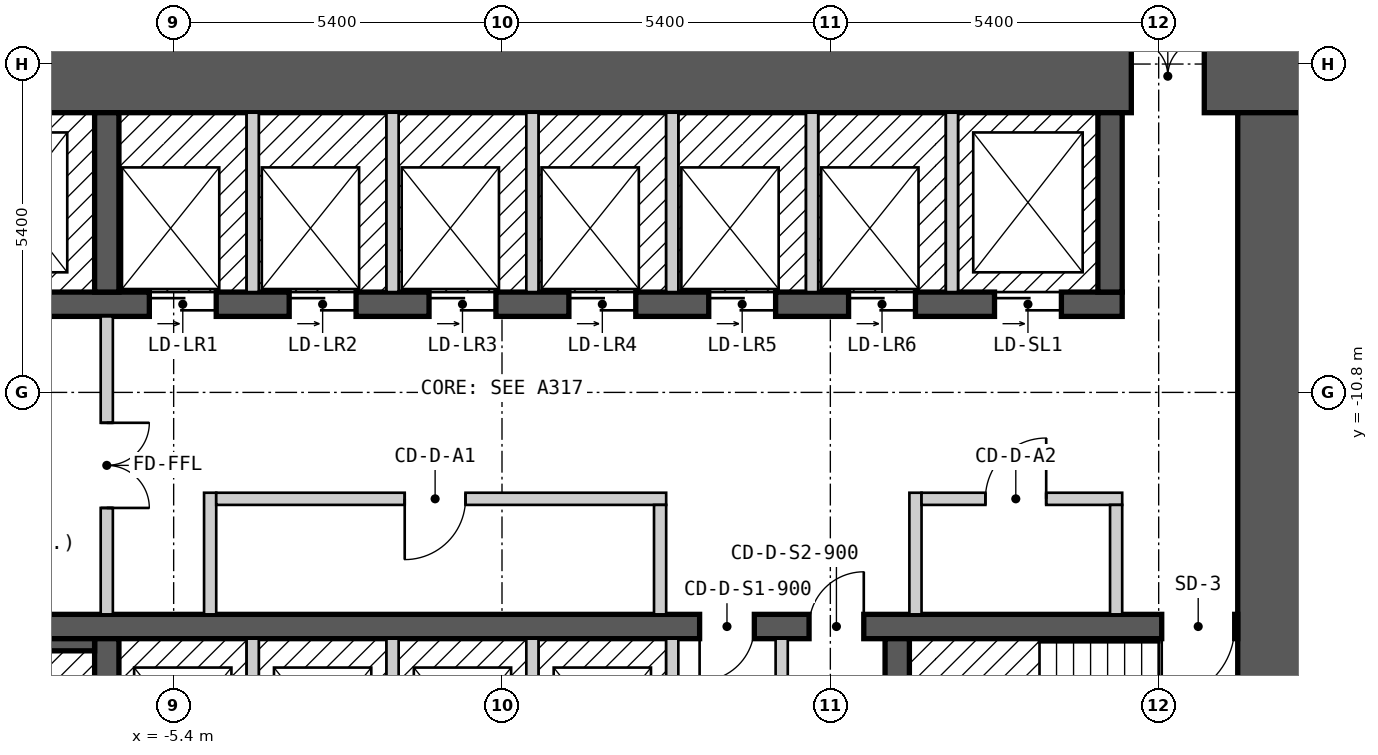
"""IFC4 building model, lengths in metres.
Left out: names, types, materials, properties, quantities, classifications, styles, units other than length and angle.
Written with IfcOpenShell. Run it as: python <this file> out.ifc"""

import sys

from ifc_helpers import new_model, si_unit, direction, frame, frame_2d, origin, place, context, subcontext, project, spatial, rectangle, extrude, element, fill, save


model = new_model("IFC4")
c1 = context("Model", 3, precision=1e-05, world=origin(), true_north=direction((0.0, 1.0)))
c2 = subcontext(c1, "Body", "Model", "MODEL_VIEW")
j1 = project(units=[si_unit("LENGTHUNIT", "METRE"), si_unit("PLANEANGLEUNIT", "RADIAN")], contexts=[c1])
p1 = place(None, origin())
s1 = spatial("IfcSite", under=j1, at=p1, CompositionType="ELEMENT")
p2 = place(p1, origin())
s2 = spatial("IfcBuilding", under=s1, at=p2, CompositionType="ELEMENT")
p3 = place(p2, frame((0.0, 0.0, 50.4)))
s3 = spatial("IfcBuildingStorey", under=s2, at=p3, CompositionType="ELEMENT", Elevation=50.4)
p4 = place(p3, frame((-13.3, -5.6, 0.0), z_axis=(0.0, 0.0, 1.0), x_axis=(1.0, 0.0, 0.0)))
e1 = element("IfcWall", 1, at=p4, inside=s3, PredefinedType="SHEAR", context=c2, shape_type="SweptSolid", body=[
    extrude(rectangle(XDim=26.6, YDim=1.2, at=frame_2d((13.3, 0.0))), origin(), (0.0, 0.0, 1.0), 2.7),
])
p5 = place(p4, frame((23.65, 0.0, 0.0)))
e2 = element("IfcOpeningElement", 2, at=p5, cuts=e1, PredefinedType="OPENING", context=c2, shape_type="SweptSolid", body=[
    extrude(rectangle(XDim=1.2, YDim=2.1, at=frame_2d((0.6, 1.05))), frame((0.0, 0.61, 0.0), z_axis=(0.0, -1.0, 0.0), x_axis=(1.0, 0.0, 0.0)), (0.0, 0.0, 1.0), 1.22),
])
p6 = place(p3, frame((12.7, -17.8, 0.0), z_axis=(0.0, 0.0, 1.0), x_axis=(0.0, 1.0, 0.0)))
e3 = element("IfcWall", 3, at=p6, inside=s3, PredefinedType="SHEAR", context=c2, shape_type="SweptSolid", body=[
    extrude(rectangle(XDim=11.6, YDim=1.2, at=frame_2d((5.8, 0.0))), origin(), (0.0, 0.0, 1.0), 2.7),
])
p7 = place(p3, frame((-12.1, -14.65, 0.0), z_axis=(0.0, 0.0, 1.0), x_axis=(1.0, 0.0, 0.0)))
e4 = element("IfcWall", 4, at=p7, inside=s3, PredefinedType="SHEAR", context=c2, shape_type="SweptSolid", body=[
    extrude(rectangle(XDim=24.2, YDim=0.4, at=frame_2d((12.1, 0.0))), origin(), (0.0, 0.0, 1.0), 2.7),
])
p8 = place(p7, frame((1.3, 0.0, 0.0), z_axis=(0.0, 0.0, 1.0), x_axis=(-1.0, 0.0, 0.0)))
e5 = element("IfcOpeningElement", 5, at=p8, cuts=e4, PredefinedType="OPENING", context=c2, shape_type="SweptSolid", body=[
    extrude(rectangle(XDim=1.2, YDim=2.1, at=frame_2d((0.6, 1.05))), frame((0.0, 0.21, 0.0), z_axis=(0.0, -1.0, 0.0), x_axis=(1.0, 0.0, 0.0)), (0.0, 0.0, 1.0), 0.42),
])
p9 = place(p7, frame((24.15, 0.0, 0.0), z_axis=(0.0, 0.0, 1.0), x_axis=(-1.0, 0.0, 0.0)))
e6 = element("IfcOpeningElement", 6, at=p9, cuts=e4, PredefinedType="OPENING", context=c2, shape_type="SweptSolid", body=[
    extrude(rectangle(XDim=1.2, YDim=2.1, at=frame_2d((0.6, 1.05))), frame((0.0, 0.21, 0.0), z_axis=(0.0, -1.0, 0.0), x_axis=(1.0, 0.0, 0.0)), (0.0, 0.0, 1.0), 0.42),
])
p10 = place(p7, frame((16.25, 0.0, 0.0), z_axis=(0.0, 0.0, 1.0), x_axis=(-1.0, 0.0, 0.0)))
e7 = element("IfcOpeningElement", 7, at=p10, cuts=e4, PredefinedType="OPENING", context=c2, shape_type="SweptSolid", body=[
    extrude(rectangle(XDim=0.9, YDim=2.1, at=frame_2d((0.45, 1.05))), frame((0.0, 0.21, 0.0), z_axis=(0.0, -1.0, 0.0), x_axis=(1.0, 0.0, 0.0)), (0.0, 0.0, 1.0), 0.42),
])
p11 = place(p7, frame((18.05, 0.0, 0.0), z_axis=(0.0, 0.0, 1.0), x_axis=(-1.0, 0.0, 0.0)))
e8 = element("IfcOpeningElement", 8, at=p11, cuts=e4, PredefinedType="OPENING", context=c2, shape_type="SweptSolid", body=[
    extrude(rectangle(XDim=0.9, YDim=2.1, at=frame_2d((0.45, 1.05))), frame((0.0, 0.21, 0.0), z_axis=(0.0, -1.0, 0.0), x_axis=(1.0, 0.0, 0.0)), (0.0, 0.0, 1.0), 0.42),
])
p12 = place(p3, frame((-12.1, -9.35, 0.0), z_axis=(0.0, 0.0, 1.0), x_axis=(1.0, 0.0, 0.0)))
e9 = element("IfcWall", 9, at=p12, inside=s3, PredefinedType="SHEAR", context=c2, shape_type="SweptSolid", body=[
    extrude(rectangle(XDim=22.3, YDim=0.4, at=frame_2d((11.15, 0.0))), origin(), (0.0, 0.0, 1.0), 2.7),
])
p13 = place(p12, frame((0.7, 0.0, 0.0)))
e10 = element("IfcOpeningElement", 10, at=p13, cuts=e9, PredefinedType="OPENING", context=c2, shape_type="SweptSolid", body=[
    extrude(rectangle(XDim=1.1, YDim=2.1, at=frame_2d((0.55, 1.05))), frame((0.0, 0.21, 0.0), z_axis=(0.0, -1.0, 0.0), x_axis=(1.0, 0.0, 0.0)), (0.0, 0.0, 1.0), 0.42),
])
p14 = place(p12, frame((3.5, 0.0, 0.0)))
e11 = element("IfcOpeningElement", 11, at=p14, cuts=e9, PredefinedType="OPENING", context=c2, shape_type="SweptSolid", body=[
    extrude(rectangle(XDim=1.1, YDim=2.1, at=frame_2d((0.55, 1.05))), frame((0.0, 0.21, 0.0), z_axis=(0.0, -1.0, 0.0), x_axis=(1.0, 0.0, 0.0)), (0.0, 0.0, 1.0), 0.42),
])
p15 = place(p12, frame((6.3, 0.0, 0.0)))
e12 = element("IfcOpeningElement", 12, at=p15, cuts=e9, PredefinedType="OPENING", context=c2, shape_type="SweptSolid", body=[
    extrude(rectangle(XDim=1.1, YDim=2.1, at=frame_2d((0.55, 1.05))), frame((0.0, 0.21, 0.0), z_axis=(0.0, -1.0, 0.0), x_axis=(1.0, 0.0, 0.0)), (0.0, 0.0, 1.0), 0.42),
])
p16 = place(p12, frame((8.6, 0.0, 0.0)))
e13 = element("IfcOpeningElement", 13, at=p16, cuts=e9, PredefinedType="OPENING", context=c2, shape_type="SweptSolid", body=[
    extrude(rectangle(XDim=1.1, YDim=2.1, at=frame_2d((0.55, 1.05))), frame((0.0, 0.21, 0.0), z_axis=(0.0, -1.0, 0.0), x_axis=(1.0, 0.0, 0.0)), (0.0, 0.0, 1.0), 0.42),
])
p17 = place(p12, frame((10.9, 0.0, 0.0)))
e14 = element("IfcOpeningElement", 14, at=p17, cuts=e9, PredefinedType="OPENING", context=c2, shape_type="SweptSolid", body=[
    extrude(rectangle(XDim=1.1, YDim=2.1, at=frame_2d((0.55, 1.05))), frame((0.0, 0.21, 0.0), z_axis=(0.0, -1.0, 0.0), x_axis=(1.0, 0.0, 0.0)), (0.0, 0.0, 1.0), 0.42),
])
p18 = place(p12, frame((13.2, 0.0, 0.0)))
e15 = element("IfcOpeningElement", 15, at=p18, cuts=e9, PredefinedType="OPENING", context=c2, shape_type="SweptSolid", body=[
    extrude(rectangle(XDim=1.1, YDim=2.1, at=frame_2d((0.55, 1.05))), frame((0.0, 0.21, 0.0), z_axis=(0.0, -1.0, 0.0), x_axis=(1.0, 0.0, 0.0)), (0.0, 0.0, 1.0), 0.42),
])
p19 = place(p12, frame((15.5, 0.0, 0.0)))
e16 = element("IfcOpeningElement", 16, at=p19, cuts=e9, PredefinedType="OPENING", context=c2, shape_type="SweptSolid", body=[
    extrude(rectangle(XDim=1.1, YDim=2.1, at=frame_2d((0.55, 1.05))), frame((0.0, 0.21, 0.0), z_axis=(0.0, -1.0, 0.0), x_axis=(1.0, 0.0, 0.0)), (0.0, 0.0, 1.0), 0.42),
])
p20 = place(p12, frame((17.8, 0.0, 0.0)))
e17 = element("IfcOpeningElement", 17, at=p20, cuts=e9, PredefinedType="OPENING", context=c2, shape_type="SweptSolid", body=[
    extrude(rectangle(XDim=1.1, YDim=2.1, at=frame_2d((0.55, 1.05))), frame((0.0, 0.21, 0.0), z_axis=(0.0, -1.0, 0.0), x_axis=(1.0, 0.0, 0.0)), (0.0, 0.0, 1.0), 0.42),
])
p21 = place(p12, frame((20.2, 0.0, 0.0)))
e18 = element("IfcOpeningElement", 18, at=p21, cuts=e9, PredefinedType="OPENING", context=c2, shape_type="SweptSolid", body=[
    extrude(rectangle(XDim=1.1, YDim=2.1, at=frame_2d((0.55, 1.05))), frame((0.0, 0.21, 0.0), z_axis=(0.0, -1.0, 0.0), x_axis=(1.0, 0.0, 0.0)), (0.0, 0.0, 1.0), 0.42),
])
for number, where, z_axis, x_axis in (
    (19, (-6.5, -17.8, 0.0), (0.0, 0.0, 1.0), (0.0, 1.0, 0.0)),
    (20, (6.5, -17.8, 0.0), (0.0, 0.0, 1.0), (0.0, 1.0, 0.0)),
    (21, (-6.5, -9.15, 0.0), (0.0, 0.0, 1.0), (0.0, 1.0, 0.0)),
    (22, (10.0, -9.15, 0.0), (0.0, 0.0, 1.0), (0.0, 1.0, 0.0)),
):
    element("IfcWall", number, at=place(p3, frame(where, z_axis=z_axis, x_axis=x_axis)), inside=s3, PredefinedType="SHEAR", context=c2, shape_type="SweptSolid", body=[
        extrude(rectangle(XDim=2.95, YDim=0.4, at=frame_2d((1.475, 0.0))), origin(), (0.0, 0.0, 1.0), 2.7),
    ])
p22 = place(p3, frame((-10.8, -14.95, 0.0), z_axis=(0.0, 0.0, 1.0), x_axis=(1.0, 0.0, 0.0)))
e23 = element("IfcWall", 23, at=p22, inside=s3, PredefinedType="SOLIDWALL", context=c2, shape_type="SweptSolid", body=[
    extrude(rectangle(XDim=4.1, YDim=0.2, at=frame_2d((2.05, 0.0))), origin(), (0.0, 0.0, 1.0), 2.7),
])
p23 = place(p3, frame((-6.5, -14.45, 0.0), z_axis=(0.0, 0.0, 1.0), x_axis=(0.0, 1.0, 0.0)))
e24 = element("IfcWall", 24, at=p23, inside=s3, PredefinedType="PARTITIONING", context=c2, shape_type="SweptSolid", body=[
    extrude(rectangle(XDim=4.9, YDim=0.2, at=frame_2d((2.45, 0.0))), origin(), (0.0, 0.0, 1.0), 2.7),
])
p24 = place(p23, frame((3.15, 0.0, 0.0), z_axis=(0.0, 0.0, 1.0), x_axis=(-1.0, 0.0, 0.0)))
e25 = element("IfcOpeningElement", 25, at=p24, cuts=e24, PredefinedType="OPENING", context=c2, shape_type="SweptSolid", body=[
    extrude(rectangle(XDim=1.4, YDim=2.1, at=frame_2d((0.7, 1.05))), frame((0.0, 0.11, 0.0), z_axis=(0.0, -1.0, 0.0), x_axis=(1.0, 0.0, 0.0)), (0.0, 0.0, 1.0), 0.22),
])
p25 = place(p3, frame((-4.8, -14.45, 0.0), z_axis=(0.0, 0.0, 1.0), x_axis=(0.0, 1.0, 0.0)))
e26 = element("IfcWall", 26, at=p25, inside=s3, PredefinedType="PARTITIONING", context=c2, shape_type="SweptSolid", body=[
    extrude(rectangle(XDim=2.0, YDim=0.2, at=frame_2d((1.0, 0.0))), origin(), (0.0, 0.0, 1.0), 2.7),
])
p26 = place(p3, frame((-4.7, -12.55, 0.0), z_axis=(0.0, 0.0, 1.0), x_axis=(1.0, 0.0, 0.0)))
e27 = element("IfcWall", 27, at=p26, inside=s3, PredefinedType="PARTITIONING", context=c2, shape_type="SweptSolid", body=[
    extrude(rectangle(XDim=7.4, YDim=0.2, at=frame_2d((3.7, 0.0))), origin(), (0.0, 0.0, 1.0), 2.7),
])
p27 = place(p26, frame((4.1, 0.0, 0.0), z_axis=(0.0, 0.0, 1.0), x_axis=(-1.0, 0.0, 0.0)))
e28 = element("IfcOpeningElement", 28, at=p27, cuts=e27, PredefinedType="OPENING", context=c2, shape_type="SweptSolid", body=[
    extrude(rectangle(XDim=1.0, YDim=2.1, at=frame_2d((0.5, 1.05))), frame((0.0, 0.11, 0.0), z_axis=(0.0, -1.0, 0.0), x_axis=(1.0, 0.0, 0.0)), (0.0, 0.0, 1.0), 0.22),
])
for number, where, z_axis, x_axis in (
    (29, (-4.1, -17.8, 0.0), (0.0, 0.0, 1.0), (0.0, 1.0, 0.0)),
    (30, (-4.1, -9.15, 0.0), (0.0, 0.0, 1.0), (0.0, 1.0, 0.0)),
    (31, (-1.8, -17.8, 0.0), (0.0, 0.0, 1.0), (0.0, 1.0, 0.0)),
    (32, (-1.8, -9.15, 0.0), (0.0, 0.0, 1.0), (0.0, 1.0, 0.0)),
    (33, (0.5, -17.8, 0.0), (0.0, 0.0, 1.0), (0.0, 1.0, 0.0)),
    (34, (0.5, -9.15, 0.0), (0.0, 0.0, 1.0), (0.0, 1.0, 0.0)),
):
    element("IfcWall", number, at=place(p3, frame(where, z_axis=z_axis, x_axis=x_axis)), inside=s3, PredefinedType="SOLIDWALL", context=c2, shape_type="SweptSolid", body=[
        extrude(rectangle(XDim=2.95, YDim=0.2, at=frame_2d((1.475, 0.0))), origin(), (0.0, 0.0, 1.0), 2.7),
    ])
p28 = place(p3, frame((2.6, -14.45, 0.0), z_axis=(0.0, 0.0, 1.0), x_axis=(0.0, 1.0, 0.0)))
e35 = element("IfcWall", 35, at=p28, inside=s3, PredefinedType="PARTITIONING", context=c2, shape_type="SweptSolid", body=[
    extrude(rectangle(XDim=1.8, YDim=0.2, at=frame_2d((0.9, 0.0))), origin(), (0.0, 0.0, 1.0), 2.7),
])
for number, where, z_axis, x_axis in (
    (36, (2.8, -17.8, 0.0), (0.0, 0.0, 1.0), (0.0, 1.0, 0.0)),
    (37, (2.8, -9.15, 0.0), (0.0, 0.0, 1.0), (0.0, 1.0, 0.0)),
):
    element("IfcWall", number, at=place(p3, frame(where, z_axis=z_axis, x_axis=x_axis)), inside=s3, PredefinedType="SOLIDWALL", context=c2, shape_type="SweptSolid", body=[
        extrude(rectangle(XDim=2.95, YDim=0.2, at=frame_2d((1.475, 0.0))), origin(), (0.0, 0.0, 1.0), 2.7),
    ])
p29 = place(p3, frame((4.6, -17.8, 0.0), z_axis=(0.0, 0.0, 1.0), x_axis=(0.0, 1.0, 0.0)))
e38 = element("IfcWall", 38, at=p29, inside=s3, PredefinedType="PARTITIONING", context=c2, shape_type="SweptSolid", body=[
    extrude(rectangle(XDim=2.95, YDim=0.2, at=frame_2d((1.475, 0.0))), origin(), (0.0, 0.0, 1.0), 2.7),
])
p30 = place(p3, frame((5.1, -9.15, 0.0), z_axis=(0.0, 0.0, 1.0), x_axis=(0.0, 1.0, 0.0)))
e39 = element("IfcWall", 39, at=p30, inside=s3, PredefinedType="SOLIDWALL", context=c2, shape_type="SweptSolid", body=[
    extrude(rectangle(XDim=2.95, YDim=0.2, at=frame_2d((1.475, 0.0))), origin(), (0.0, 0.0, 1.0), 2.7),
])
p31 = place(p3, frame((6.8, -14.45, 0.0), z_axis=(0.0, 0.0, 1.0), x_axis=(0.0, 1.0, 0.0)))
e40 = element("IfcWall", 40, at=p31, inside=s3, PredefinedType="PARTITIONING", context=c2, shape_type="SweptSolid", body=[
    extrude(rectangle(XDim=2.0, YDim=0.2, at=frame_2d((1.0, 0.0))), origin(), (0.0, 0.0, 1.0), 2.7),
])
p32 = place(p3, frame((6.9, -12.55, 0.0), z_axis=(0.0, 0.0, 1.0), x_axis=(1.0, 0.0, 0.0)))
e41 = element("IfcWall", 41, at=p32, inside=s3, PredefinedType="PARTITIONING", context=c2, shape_type="SweptSolid", body=[
    extrude(rectangle(XDim=3.3, YDim=0.2, at=frame_2d((1.65, 0.0))), origin(), (0.0, 0.0, 1.0), 2.7),
])
p33 = place(p32, frame((2.05, 0.0, 0.0), z_axis=(0.0, 0.0, 1.0), x_axis=(-1.0, 0.0, 0.0)))
e42 = element("IfcOpeningElement", 42, at=p33, cuts=e41, PredefinedType="OPENING", context=c2, shape_type="SweptSolid", body=[
    extrude(rectangle(XDim=1.0, YDim=2.1, at=frame_2d((0.5, 1.05))), frame((0.0, 0.11, 0.0), z_axis=(0.0, -1.0, 0.0), x_axis=(1.0, 0.0, 0.0)), (0.0, 0.0, 1.0), 0.22),
])
p34 = place(p3, frame((7.4, -9.15, 0.0), z_axis=(0.0, 0.0, 1.0), x_axis=(0.0, 1.0, 0.0)))
e43 = element("IfcWall", 43, at=p34, inside=s3, PredefinedType="SOLIDWALL", context=c2, shape_type="SweptSolid", body=[
    extrude(rectangle(XDim=2.95, YDim=0.2, at=frame_2d((1.475, 0.0))), origin(), (0.0, 0.0, 1.0), 2.7),
])
p35 = place(p3, frame((10.1, -14.45, 0.0), z_axis=(0.0, 0.0, 1.0), x_axis=(0.0, 1.0, 0.0)))
e44 = element("IfcWall", 44, at=p35, inside=s3, PredefinedType="PARTITIONING", context=c2, shape_type="SweptSolid", body=[
    extrude(rectangle(XDim=1.8, YDim=0.2, at=frame_2d((0.9, 0.0))), origin(), (0.0, 0.0, 1.0), 2.7),
])
p36 = place(p15, origin())
e45 = element("IfcDoor", 45, at=p36, inside=s3, OperationType="DOUBLE_DOOR_SLIDING", PredefinedType="DOOR", context=c2, shape_type="SweptSolid", body=[
    extrude(rectangle(XDim=1.1, YDim=2.1, at=frame_2d((0.55, 1.05))), frame((0.0, 0.025, 0.0), z_axis=(0.0, -1.0, 0.0), x_axis=(1.0, 0.0, 0.0)), (0.0, 0.0, 1.0), 0.05),
])
fill(e12, e45)
p37 = place(p16, origin())
e46 = element("IfcDoor", 46, at=p37, inside=s3, OperationType="DOUBLE_DOOR_SLIDING", PredefinedType="DOOR", context=c2, shape_type="SweptSolid", body=[
    extrude(rectangle(XDim=1.1, YDim=2.1, at=frame_2d((0.55, 1.05))), frame((0.0, 0.025, 0.0), z_axis=(0.0, -1.0, 0.0), x_axis=(1.0, 0.0, 0.0)), (0.0, 0.0, 1.0), 0.05),
])
fill(e13, e46)
p38 = place(p17, origin())
e47 = element("IfcDoor", 47, at=p38, inside=s3, OperationType="DOUBLE_DOOR_SLIDING", PredefinedType="DOOR", context=c2, shape_type="SweptSolid", body=[
    extrude(rectangle(XDim=1.1, YDim=2.1, at=frame_2d((0.55, 1.05))), frame((0.0, 0.025, 0.0), z_axis=(0.0, -1.0, 0.0), x_axis=(1.0, 0.0, 0.0)), (0.0, 0.0, 1.0), 0.05),
])
fill(e14, e47)
p39 = place(p18, origin())
e48 = element("IfcDoor", 48, at=p39, inside=s3, OperationType="DOUBLE_DOOR_SLIDING", PredefinedType="DOOR", context=c2, shape_type="SweptSolid", body=[
    extrude(rectangle(XDim=1.1, YDim=2.1, at=frame_2d((0.55, 1.05))), frame((0.0, 0.025, 0.0), z_axis=(0.0, -1.0, 0.0), x_axis=(1.0, 0.0, 0.0)), (0.0, 0.0, 1.0), 0.05),
])
fill(e15, e48)
p40 = place(p19, origin())
e49 = element("IfcDoor", 49, at=p40, inside=s3, OperationType="DOUBLE_DOOR_SLIDING", PredefinedType="DOOR", context=c2, shape_type="SweptSolid", body=[
    extrude(rectangle(XDim=1.1, YDim=2.1, at=frame_2d((0.55, 1.05))), frame((0.0, 0.025, 0.0), z_axis=(0.0, -1.0, 0.0), x_axis=(1.0, 0.0, 0.0)), (0.0, 0.0, 1.0), 0.05),
])
fill(e16, e49)
p41 = place(p20, origin())
e50 = element("IfcDoor", 50, at=p41, inside=s3, OperationType="DOUBLE_DOOR_SLIDING", PredefinedType="DOOR", context=c2, shape_type="SweptSolid", body=[
    extrude(rectangle(XDim=1.1, YDim=2.1, at=frame_2d((0.55, 1.05))), frame((0.0, 0.025, 0.0), z_axis=(0.0, -1.0, 0.0), x_axis=(1.0, 0.0, 0.0)), (0.0, 0.0, 1.0), 0.05),
])
fill(e17, e50)
p42 = place(p21, origin())
e51 = element("IfcDoor", 51, at=p42, inside=s3, OperationType="DOUBLE_DOOR_SLIDING", PredefinedType="DOOR", context=c2, shape_type="SweptSolid", body=[
    extrude(rectangle(XDim=1.1, YDim=2.1, at=frame_2d((0.55, 1.05))), frame((0.0, 0.025, 0.0), z_axis=(0.0, -1.0, 0.0), x_axis=(1.0, 0.0, 0.0)), (0.0, 0.0, 1.0), 0.05),
])
fill(e18, e51)
p43 = place(p9, origin())
e52 = element("IfcDoor", 52, at=p43, inside=s3, OperationType="SINGLE_SWING_RIGHT", PredefinedType="DOOR", context=c2, shape_type="SweptSolid", body=[
    extrude(rectangle(XDim=1.2, YDim=2.1, at=frame_2d((0.6, 1.05))), frame((0.0, 0.025, 0.0), z_axis=(0.0, -1.0, 0.0), x_axis=(1.0, 0.0, 0.0)), (0.0, 0.0, 1.0), 0.05),
])
fill(e6, e52)
p44 = place(p24, origin())
e53 = element("IfcDoor", 53, at=p44, inside=s3, OperationType="DOUBLE_DOOR_SINGLE_SWING", PredefinedType="DOOR", context=c2, shape_type="SweptSolid", body=[
    extrude(rectangle(XDim=1.4, YDim=2.1, at=frame_2d((0.7, 1.05))), frame((0.0, 0.025, 0.0), z_axis=(0.0, -1.0, 0.0), x_axis=(1.0, 0.0, 0.0)), (0.0, 0.0, 1.0), 0.05),
])
fill(e25, e53)
p45 = place(p5, origin())
e54 = element("IfcDoor", 54, at=p45, inside=s3, OperationType="DOUBLE_DOOR_SINGLE_SWING", PredefinedType="DOOR", context=c2, shape_type="SweptSolid", body=[
    extrude(rectangle(XDim=1.2, YDim=2.1, at=frame_2d((0.6, 1.05))), frame((0.0, 0.025, 0.0), z_axis=(0.0, -1.0, 0.0), x_axis=(1.0, 0.0, 0.0)), (0.0, 0.0, 1.0), 0.05),
])
fill(e2, e54)
p46 = place(p27, origin())
e55 = element("IfcDoor", 55, at=p46, inside=s3, OperationType="SINGLE_SWING_RIGHT", PredefinedType="DOOR", context=c2, shape_type="SweptSolid", body=[
    extrude(rectangle(XDim=1.0, YDim=2.1, at=frame_2d((0.5, 1.05))), frame((0.0, 0.025, 0.0), z_axis=(0.0, -1.0, 0.0), x_axis=(1.0, 0.0, 0.0)), (0.0, 0.0, 1.0), 0.05),
])
fill(e28, e55)
p47 = place(p33, origin())
e56 = element("IfcDoor", 56, at=p47, inside=s3, OperationType="SINGLE_SWING_LEFT", PredefinedType="DOOR", context=c2, shape_type="SweptSolid", body=[
    extrude(rectangle(XDim=1.0, YDim=2.1, at=frame_2d((0.5, 1.05))), frame((0.0, 0.025, 0.0), z_axis=(0.0, -1.0, 0.0), x_axis=(1.0, 0.0, 0.0)), (0.0, 0.0, 1.0), 0.05),
])
fill(e42, e56)
p48 = place(p10, origin())
e57 = element("IfcDoor", 57, at=p48, inside=s3, OperationType="SINGLE_SWING_RIGHT", PredefinedType="DOOR", context=c2, shape_type="SweptSolid", body=[
    extrude(rectangle(XDim=0.9, YDim=2.1, at=frame_2d((0.45, 1.05))), frame((0.0, 0.025, 0.0), z_axis=(0.0, -1.0, 0.0), x_axis=(1.0, 0.0, 0.0)), (0.0, 0.0, 1.0), 0.05),
])
fill(e7, e57)
p49 = place(p11, origin())
e58 = element("IfcDoor", 58, at=p49, inside=s3, OperationType="SINGLE_SWING_LEFT", PredefinedType="DOOR", context=c2, shape_type="SweptSolid", body=[
    extrude(rectangle(XDim=0.9, YDim=2.1, at=frame_2d((0.45, 1.05))), frame((0.0, 0.025, 0.0), z_axis=(0.0, -1.0, 0.0), x_axis=(1.0, 0.0, 0.0)), (0.0, 0.0, 1.0), 0.05),
])
fill(e8, e58)
save(model, sys.argv[1])
